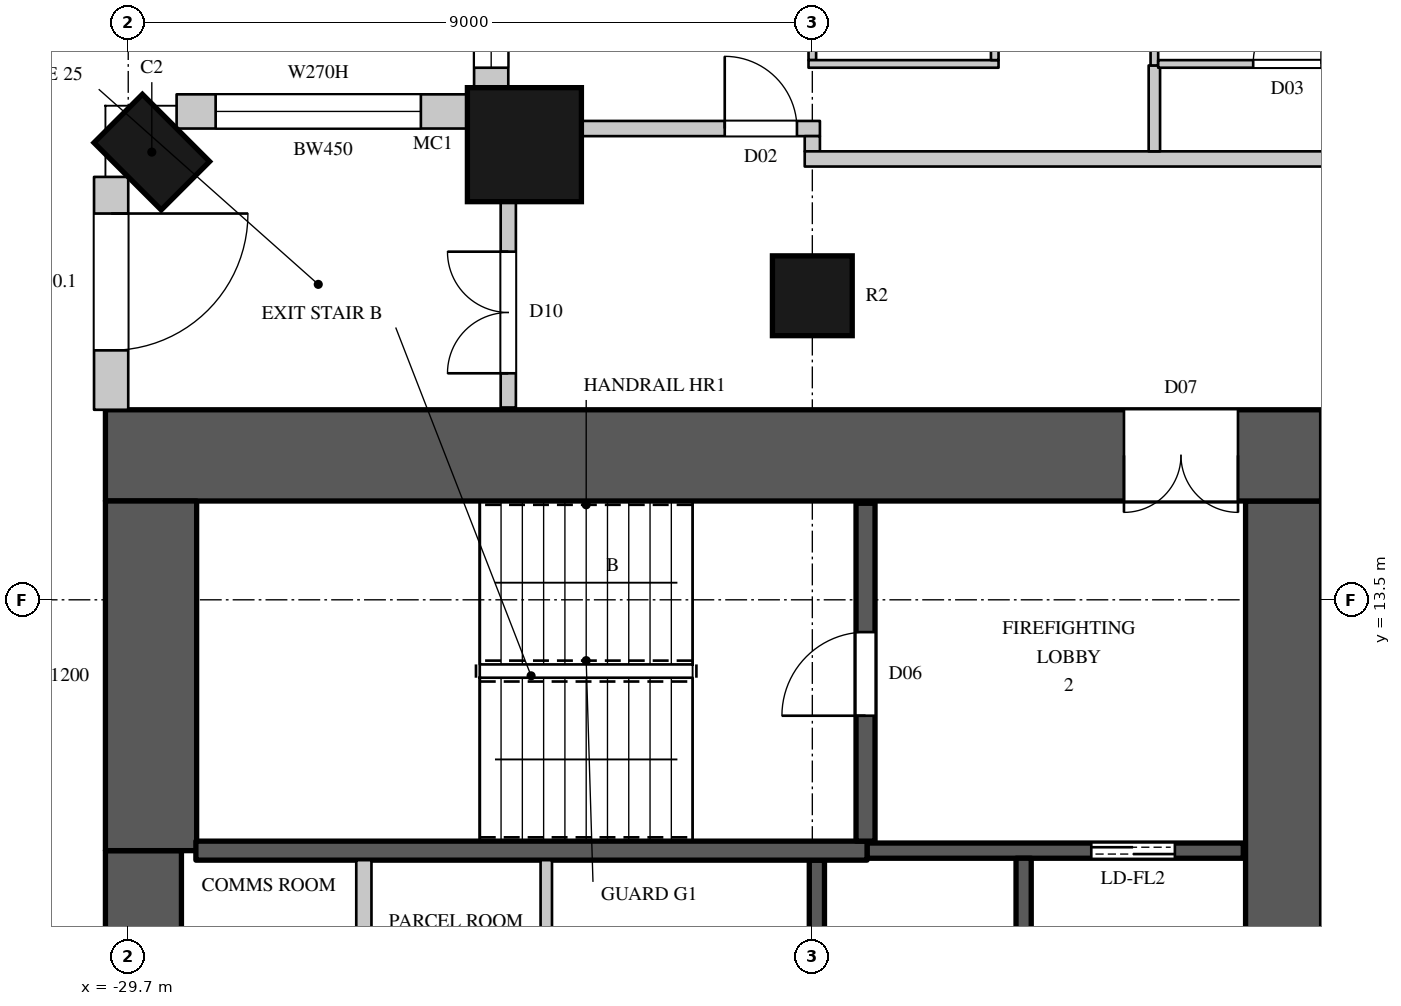
"""IFC4 building model, lengths in metres.
Left out: names, types, materials, properties, quantities, classifications, styles, units other than length and angle.
Written with IfcOpenShell. Run it as: python <this file> out.ifc"""

import sys

from ifc_helpers import new_model, si_unit, direction, frame, frame_2d, origin, origin_2d, place, context, subcontext, project, spatial, rectangle, circle, extrude, element, fill, save


model = new_model("IFC4")
c1 = context("Model", 3, precision=1e-05, world=origin(), true_north=direction((0.0, 1.0)))
c2 = subcontext(c1, "Body", "Model", "MODEL_VIEW")
j1 = project(units=[si_unit("LENGTHUNIT", "METRE"), si_unit("PLANEANGLEUNIT", "RADIAN")], contexts=[c1])
p1 = place(None, origin())
s1 = spatial("IfcSite", under=j1, at=p1, CompositionType="ELEMENT")
p2 = place(p1, origin())
s2 = spatial("IfcBuilding", under=s1, at=p2, CompositionType="ELEMENT")
p3 = place(p2, frame((0.0, 0.0, 120.3)))
s3 = spatial("IfcBuildingStorey", under=s2, at=p3, CompositionType="ELEMENT", Elevation=120.3)
p4 = place(p3, frame((-29.39, 19.39, 0.0), z_axis=(0.0, 0.0, 1.0), x_axis=(-0.707106781187, -0.707106781187, 0.0)))
e1 = element("IfcColumn", 1, at=p4, inside=s3, PredefinedType="COLUMN", context=c2, shape_type="SweptSolid", body=[
    extrude(rectangle(XDim=0.9, YDim=1.25, at=origin_2d()), origin(), (0.0, 0.0, 1.0), 3.6),
])
p5 = place(p3, frame((-24.488, 19.488, 0.0), z_axis=(0.0, 0.0, 1.0), x_axis=(1.0, 0.0, 0.0)))
e2 = element("IfcColumn", 2, at=p5, inside=s3, PredefinedType="COLUMN", context=c2, shape_type="SweptSolid", body=[
    extrude(circle(Radius=0.75, at=origin_2d()), origin(), (0.0, 0.0, 1.0), 3.6),
])
p6 = place(p3, frame((-20.7, 17.5, 0.0), z_axis=(0.0, 0.0, 1.0), x_axis=(1.0, 0.0, 0.0)))
e3 = element("IfcColumn", 3, at=p6, inside=s3, PredefinedType="COLUMN", context=c2, shape_type="SweptSolid", body=[
    extrude(circle(Radius=0.525, at=origin_2d()), origin(), (0.0, 0.0, 1.0), 3.6),
])
p7 = place(p3, frame((-29.925, 19.064, 0.0), z_axis=(0.0, 0.0, 1.0), x_axis=(0.0, -1.0, 0.0)))
e4 = element("IfcWall", 4, at=p7, inside=s3, PredefinedType="SOLIDWALL", context=c2, shape_type="SweptSolid", body=[
    extrude(rectangle(XDim=3.064, YDim=0.45, at=frame_2d((1.532, 0.0))), origin(), (0.0, 0.0, 1.0), 3.3),
])
p8 = place(p7, frame((0.482, 0.0, 0.0)))
e5 = element("IfcOpeningElement", 5, at=p8, cuts=e4, PredefinedType="OPENING", context=c2, shape_type="SweptSolid", body=[
    extrude(rectangle(XDim=1.8, YDim=2.4, at=frame_2d((0.9, 1.2))), frame((0.0, 0.235, 0.0), z_axis=(0.0, -1.0, 0.0), x_axis=(1.0, 0.0, 0.0)), (0.0, 0.0, 1.0), 0.47),
])
p9 = place(p3, frame((-24.925, 22.05, 0.0), z_axis=(0.0, 0.0, 1.0), x_axis=(0.0, -1.0, 0.0)))
e6 = element("IfcWall", 6, at=p9, inside=s3, PredefinedType="SOLIDWALL", context=c2, shape_type="SweptSolid", body=[
    extrude(rectangle(XDim=1.843, YDim=0.45, at=frame_2d((0.921, 0.0))), origin(), (0.0, 0.0, 1.0), 3.3),
])
p10 = place(p9, frame((0.35, 0.0, 1.05)))
e7 = element("IfcOpeningElement", 7, at=p10, cuts=e6, PredefinedType="OPENING", context=c2, shape_type="SweptSolid", body=[
    extrude(rectangle(XDim=1.2, YDim=2.0, at=frame_2d((0.6, 1.0))), frame((0.0, 0.235, 0.0), z_axis=(0.0, -1.0, 0.0), x_axis=(1.0, 0.0, 0.0)), (0.0, 0.0, 1.0), 0.47),
])
p11 = place(p3, frame((-25.207, 19.925, 0.0), z_axis=(0.0, 0.0, 1.0), x_axis=(-1.0, 0.0, 0.0)))
e8 = element("IfcWall", 8, at=p11, inside=s3, PredefinedType="SOLIDWALL", context=c2, shape_type="SweptSolid", body=[
    extrude(rectangle(XDim=3.857, YDim=0.45, at=frame_2d((1.928, 0.0))), origin(), (0.0, 0.0, 1.0), 3.3),
])
p12 = place(p11, frame((0.643, 0.0, 1.05)))
e9 = element("IfcOpeningElement", 9, at=p12, cuts=e8, PredefinedType="OPENING", context=c2, shape_type="SweptSolid", body=[
    extrude(rectangle(XDim=2.7, YDim=2.0, at=frame_2d((1.35, 1.0))), frame((0.0, 0.235, 0.0), z_axis=(0.0, -1.0, 0.0), x_axis=(1.0, 0.0, 0.0)), (0.0, 0.0, 1.0), 0.47),
])
p13 = place(p3, frame((-30.0, 15.4, 0.0), z_axis=(0.0, 0.0, 1.0), x_axis=(1.0, 0.0, 0.0)))
e10 = element("IfcWall", 10, at=p13, inside=s3, PredefinedType="SHEAR", context=c2, shape_type="SweptSolid", body=[
    extrude(rectangle(XDim=16.0, YDim=1.2, at=frame_2d((8.0, 0.0))), origin(), (0.0, 0.0, 1.0), 3.6),
])
p14 = place(p13, frame((13.4, 0.0, 0.0)))
e11 = element("IfcOpeningElement", 11, at=p14, cuts=e10, PredefinedType="OPENING", context=c2, shape_type="SweptSolid", body=[
    extrude(rectangle(XDim=1.5, YDim=2.4, at=frame_2d((0.75, 1.2))), frame((0.0, 0.61, 0.0), z_axis=(0.0, -1.0, 0.0), x_axis=(1.0, 0.0, 0.0)), (0.0, 0.0, 1.0), 1.22),
])
p15 = place(p3, frame((-14.5, -14.8, 0.0), z_axis=(0.0, 0.0, 1.0), x_axis=(0.0, 1.0, 0.0)))
e12 = element("IfcWall", 12, at=p15, inside=s3, PredefinedType="SHEAR", context=c2, shape_type="SweptSolid", body=[
    extrude(rectangle(XDim=29.6, YDim=1.0, at=frame_2d((14.8, 0.0))), origin(), (0.0, 0.0, 1.0), 3.6),
])
p16 = place(p15, frame((8.45, 0.0, 0.0)))
e13 = element("IfcOpeningElement", 13, at=p16, cuts=e12, PredefinedType="OPENING", context=c2, shape_type="SweptSolid", body=[
    extrude(rectangle(XDim=1.5, YDim=2.4, at=frame_2d((0.75, 1.2))), frame((0.0, 0.51, 0.0), z_axis=(0.0, -1.0, 0.0), x_axis=(1.0, 0.0, 0.0)), (0.0, 0.0, 1.0), 1.02),
])
p17 = place(p15, frame((19.65, 0.0, 0.0)))
e14 = element("IfcOpeningElement", 14, at=p17, cuts=e12, PredefinedType="OPENING", context=c2, shape_type="SweptSolid", body=[
    extrude(rectangle(XDim=1.5, YDim=2.4, at=frame_2d((0.75, 1.2))), frame((0.0, 0.51, 0.0), z_axis=(0.0, -1.0, 0.0), x_axis=(1.0, 0.0, 0.0)), (0.0, 0.0, 1.0), 1.02),
])
p18 = place(p15, frame((14.5, 0.0, 0.0)))
e15 = element("IfcOpeningElement", 15, at=p18, cuts=e12, PredefinedType="OPENING", context=c2, shape_type="SweptSolid", body=[
    extrude(rectangle(XDim=0.6, YDim=2.0, at=frame_2d((0.3, 1.0))), frame((0.0, 0.51, 0.0), z_axis=(0.0, -1.0, 0.0), x_axis=(1.0, 0.0, 0.0)), (0.0, 0.0, 1.0), 1.02),
])
p19 = place(p3, frame((-29.5, -10.2, 0.0), z_axis=(0.0, 0.0, 1.0), x_axis=(0.0, 1.0, 0.0)))
e16 = element("IfcWall", 16, at=p19, inside=s3, PredefinedType="SHEAR", context=c2, shape_type="SweptSolid", body=[
    extrude(rectangle(XDim=20.4, YDim=1.0, at=frame_2d((10.2, 0.0))), origin(), (0.0, 0.0, 1.0), 3.6),
])
p20 = place(p3, frame((-29.4, 10.2, 0.0), z_axis=(0.0, 0.0, 1.0), x_axis=(0.0, 1.0, 0.0)))
e17 = element("IfcWall", 17, at=p20, inside=s3, PredefinedType="SHEAR", context=c2, shape_type="SweptSolid", body=[
    extrude(rectangle(XDim=4.6, YDim=1.2, at=frame_2d((2.3, 0.0))), origin(), (0.0, 0.0, 1.0), 3.6),
])
p21 = place(p3, frame((-24.7, 16.03, 0.0), z_axis=(0.0, 0.0, 1.0), x_axis=(0.0, 1.0, 0.0)))
e18 = element("IfcWall", 18, at=p21, inside=s3, PredefinedType="PARTITIONING", context=c2, shape_type="SweptSolid", body=[
    extrude(rectangle(XDim=2.722, YDim=0.2, at=frame_2d((1.361, 0.0))), origin(), (0.0, 0.0, 1.0), 3.3),
])
p22 = place(p21, frame((0.45, 0.0, 0.0)))
e19 = element("IfcOpeningElement", 19, at=p22, cuts=e18, PredefinedType="OPENING", context=c2, shape_type="SweptSolid", body=[
    extrude(rectangle(XDim=1.6, YDim=2.4, at=frame_2d((0.8, 1.2))), frame((0.0, 0.11, 0.0), z_axis=(0.0, -1.0, 0.0), x_axis=(1.0, 0.0, 0.0)), (0.0, 0.0, 1.0), 0.22),
])
p23 = place(p3, frame((-23.752, 19.7, 0.0), z_axis=(0.0, 0.0, 1.0), x_axis=(1.0, 0.0, 0.0)))
e20 = element("IfcWall", 20, at=p23, inside=s3, PredefinedType="PARTITIONING", context=c2, shape_type="SweptSolid", body=[
    extrude(rectangle(XDim=3.152, YDim=0.2, at=frame_2d((1.576, 0.0))), origin(), (0.0, 0.0, 1.0), 3.3),
])
p24 = place(p23, frame((1.9, 0.0, 0.0)))
e21 = element("IfcOpeningElement", 21, at=p24, cuts=e20, PredefinedType="OPENING", context=c2, shape_type="SweptSolid", body=[
    extrude(rectangle(XDim=0.95, YDim=2.2, at=frame_2d((0.475, 1.1))), frame((0.0, 0.11, 0.0), z_axis=(0.0, -1.0, 0.0), x_axis=(1.0, 0.0, 0.0)), (0.0, 0.0, 1.0), 0.22),
])
p25 = place(p3, frame((-20.7, 19.4, 0.0), z_axis=(0.0, 0.0, 1.0), x_axis=(0.0, 1.0, 0.0)))
e22 = element("IfcWall", 22, at=p25, inside=s3, PredefinedType="PARTITIONING", context=c2, shape_type="SweptSolid", body=[
    extrude(rectangle(XDim=0.2, YDim=0.2, at=frame_2d((0.1, 0.0))), origin(), (0.0, 0.0, 1.0), 3.3),
])
p26 = place(p3, frame((-20.8, 19.3, 0.0), z_axis=(0.0, 0.0, 1.0), x_axis=(1.0, 0.0, 0.0)))
e23 = element("IfcWall", 23, at=p26, inside=s3, PredefinedType="PARTITIONING", context=c2, shape_type="SweptSolid", body=[
    extrude(rectangle(XDim=38.464, YDim=0.2, at=frame_2d((19.232, 0.0))), origin(), (0.0, 0.0, 1.0), 3.3),
])
p27 = place(p26, frame((24.05, 0.0, 0.0)))
e24 = element("IfcOpeningElement", 24, at=p27, cuts=e23, PredefinedType="OPENING", context=c2, shape_type="SweptSolid", body=[
    extrude(rectangle(XDim=0.9, YDim=2.2, at=frame_2d((0.45, 1.1))), frame((0.0, 0.11, 0.0), z_axis=(0.0, -1.0, 0.0), x_axis=(1.0, 0.0, 0.0)), (0.0, 0.0, 1.0), 0.22),
])
p28 = place(p26, frame((11.2, 0.0, 0.0)))
e25 = element("IfcOpeningElement", 25, at=p28, cuts=e23, PredefinedType="OPENING", context=c2, shape_type="SweptSolid", body=[
    extrude(rectangle(XDim=0.95, YDim=2.2, at=frame_2d((0.475, 1.1))), frame((0.0, 0.11, 0.0), z_axis=(0.0, -1.0, 0.0), x_axis=(1.0, 0.0, 0.0)), (0.0, 0.0, 1.0), 0.22),
])
p29 = place(p26, frame((15.05, 0.0, 0.0)))
e26 = element("IfcOpeningElement", 26, at=p29, cuts=e23, PredefinedType="OPENING", context=c2, shape_type="SweptSolid", body=[
    extrude(rectangle(XDim=0.95, YDim=2.2, at=frame_2d((0.475, 1.1))), frame((0.0, 0.11, 0.0), z_axis=(0.0, -1.0, 0.0), x_axis=(1.0, 0.0, 0.0)), (0.0, 0.0, 1.0), 0.22),
])
p30 = place(p26, frame((32.0, 0.0, 0.0)))
e27 = element("IfcOpeningElement", 27, at=p30, cuts=e23, PredefinedType="OPENING", context=c2, shape_type="SweptSolid", body=[
    extrude(rectangle(XDim=0.95, YDim=2.2, at=frame_2d((0.475, 1.1))), frame((0.0, 0.11, 0.0), z_axis=(0.0, -1.0, 0.0), x_axis=(1.0, 0.0, 0.0)), (0.0, 0.0, 1.0), 0.22),
])
p31 = place(p3, frame((-24.2, 7.5, 0.0), z_axis=(0.0, 0.0, 1.0), x_axis=(0.0, 1.0, 0.0)))
e28 = element("IfcWall", 28, at=p31, inside=s3, PredefinedType="PARTITIONING", context=c2, shape_type="SweptSolid", body=[
    extrude(rectangle(XDim=2.575, YDim=0.15, at=frame_2d((1.288, 0.0))), origin(), (0.0, 0.0, 1.0), 3.3),
])
p32 = place(p3, frame((-16.2, 19.4, 0.0), z_axis=(0.0, 0.0, 1.0), x_axis=(0.0, 1.0, 0.0)))
e29 = element("IfcWall", 29, at=p32, inside=s3, PredefinedType="PARTITIONING", context=c2, shape_type="SweptSolid", body=[
    extrude(rectangle(XDim=1.13, YDim=0.15, at=frame_2d((0.565, 0.0))), origin(), (0.0, 0.0, 1.0), 2.65),
])
p33 = place(p3, frame((-26.6, 7.5, 0.0), z_axis=(0.0, 0.0, 1.0), x_axis=(0.0, 1.0, 0.0)))
e30 = element("IfcWall", 30, at=p33, inside=s3, PredefinedType="PARTITIONING", context=c2, shape_type="SweptSolid", body=[
    extrude(rectangle(XDim=2.575, YDim=0.2, at=frame_2d((1.288, 0.0))), origin(), (0.0, 0.0, 1.0), 3.3),
])
p34 = place(p3, frame((-20.64, 7.5, 0.0), z_axis=(0.0, 0.0, 1.0), x_axis=(0.0, 1.0, 0.0)))
e31 = element("IfcWall", 31, at=p34, inside=s3, PredefinedType="SHEAR", context=c2, shape_type="SweptSolid", body=[
    extrude(rectangle(XDim=2.575, YDim=0.2, at=frame_2d((1.288, 0.0))), origin(), (0.0, 0.0, 1.0), 3.3),
])
p35 = place(p3, frame((-19.98, 10.2, 0.0), z_axis=(0.0, 0.0, 1.0), x_axis=(1.0, 0.0, 0.0)))
e32 = element("IfcWall", 32, at=p35, inside=s3, PredefinedType="SHEAR", context=c2, shape_type="SweptSolid", body=[
    extrude(rectangle(XDim=4.95, YDim=0.2, at=frame_2d((2.475, 0.0))), origin(), (0.0, 0.0, 1.0), 3.3),
])
p36 = place(p35, frame((2.95, 0.0, 0.0)))
e33 = element("IfcOpeningElement", 33, at=p36, cuts=e32, PredefinedType="OPENING", context=c2, shape_type="SweptSolid", body=[
    extrude(rectangle(XDim=1.1, YDim=2.2, at=frame_2d((0.55, 1.1))), frame((0.0, 0.11, 0.0), z_axis=(0.0, -1.0, 0.0), x_axis=(1.0, 0.0, 0.0)), (0.0, 0.0, 1.0), 0.22),
])
p37 = place(p3, frame((-17.92, 7.5, 0.0), z_axis=(0.0, 0.0, 1.0), x_axis=(0.0, 1.0, 0.0)))
e34 = element("IfcWall", 34, at=p37, inside=s3, PredefinedType="SHEAR", context=c2, shape_type="SweptSolid", body=[
    extrude(rectangle(XDim=2.6, YDim=0.2, at=frame_2d((1.3, 0.0))), origin(), (0.0, 0.0, 1.0), 3.6),
])
p38 = place(p3, frame((-28.81, 10.2, 0.0), z_axis=(0.0, 0.0, 1.0), x_axis=(1.0, 0.0, 0.0)))
e35 = element("IfcWall", 35, at=p38, inside=s3, PredefinedType="SHEAR", context=c2, shape_type="SweptSolid", body=[
    extrude(rectangle(XDim=8.83, YDim=0.25, at=frame_2d((4.415, 0.0))), origin(), (0.0, 0.0, 1.0), 3.3),
])
p39 = place(p3, frame((-20.0, 10.325, 0.0), z_axis=(0.0, 0.0, 1.0), x_axis=(0.0, 1.0, 0.0)))
e36 = element("IfcWall", 36, at=p39, inside=s3, PredefinedType="SHEAR", context=c2, shape_type="SweptSolid", body=[
    extrude(rectangle(XDim=4.445, YDim=0.25, at=frame_2d((2.223, 0.0))), origin(), (0.0, 0.0, 1.0), 3.3),
])
p40 = place(p39, frame((1.65, 0.0, 0.0)))
e37 = element("IfcOpeningElement", 37, at=p40, cuts=e36, PredefinedType="OPENING", context=c2, shape_type="SweptSolid", body=[
    extrude(rectangle(XDim=1.1, YDim=2.2, at=frame_2d((0.55, 1.1))), frame((0.0, 0.135, 0.0), z_axis=(0.0, -1.0, 0.0), x_axis=(1.0, 0.0, 0.0)), (0.0, 0.0, 1.0), 0.27),
])
p41 = place(p3, frame((-20.7, 20.6, 0.0), z_axis=(0.0, 0.0, 1.0), x_axis=(0.0, 1.0, 0.0)))
e38 = element("IfcWall", 38, at=p41, inside=s3, PredefinedType="PARTITIONING", context=c2, shape_type="SweptSolid", body=[
    extrude(rectangle(XDim=2.6, YDim=0.1, at=frame_2d((1.3, 0.0))), origin(), (0.0, 0.0, 1.0), 2.75),
])
p42 = place(p41, frame((0.85, 0.0, 0.0)))
e39 = element("IfcOpeningElement", 39, at=p42, cuts=e38, PredefinedType="OPENING", context=c2, shape_type="SweptSolid", body=[
    extrude(rectangle(XDim=0.9, YDim=2.2, at=frame_2d((0.45, 1.1))), frame((0.0, 0.06, 0.0), z_axis=(0.0, -1.0, 0.0), x_axis=(1.0, 0.0, 0.0)), (0.0, 0.0, 1.0), 0.12),
])
p43 = place(p3, frame((-20.75, 20.55, 0.0), z_axis=(0.0, 0.0, 1.0), x_axis=(1.0, 0.0, 0.0)))
e40 = element("IfcWall", 40, at=p43, inside=s3, PredefinedType="PARTITIONING", context=c2, shape_type="SweptSolid", body=[
    extrude(rectangle(XDim=2.5, YDim=0.1, at=frame_2d((1.25, 0.0))), origin(), (0.0, 0.0, 1.0), 3.3),
])
p44 = place(p3, frame((-18.3, 20.6, 0.0), z_axis=(0.0, 0.0, 1.0), x_axis=(0.0, 1.0, 0.0)))
e41 = element("IfcWall", 41, at=p44, inside=s3, PredefinedType="PARTITIONING", context=c2, shape_type="SweptSolid", body=[
    extrude(rectangle(XDim=2.6, YDim=0.1, at=frame_2d((1.3, 0.0))), origin(), (0.0, 0.0, 1.0), 3.3),
])
p45 = place(p3, frame((-16.2, 20.53, 0.0), z_axis=(0.0, 0.0, 1.0), x_axis=(0.0, 1.0, 0.0)))
e42 = element("IfcWall", 42, at=p45, inside=s3, PredefinedType="PARTITIONING", context=c2, shape_type="SweptSolid", body=[
    extrude(rectangle(XDim=2.74, YDim=0.1, at=frame_2d((1.37, 0.0))), origin(), (0.0, 0.0, 1.0), 2.65),
])
p46 = place(p3, frame((-16.15, 20.55, 0.0), z_axis=(0.0, 0.0, 1.0), x_axis=(1.0, 0.0, 0.0)))
e43 = element("IfcWall", 43, at=p46, inside=s3, PredefinedType="PARTITIONING", context=c2, shape_type="SweptSolid", body=[
    extrude(rectangle(XDim=2.396, YDim=0.1, at=frame_2d((1.198, 0.0))), origin(), (0.0, 0.0, 1.0), 3.3),
])
p47 = place(p46, frame((1.25, 0.0, 0.0)))
e44 = element("IfcOpeningElement", 44, at=p47, cuts=e43, PredefinedType="OPENING", context=c2, shape_type="SweptSolid", body=[
    extrude(rectangle(XDim=0.9, YDim=2.2, at=frame_2d((0.45, 1.1))), frame((0.0, 0.06, 0.0), z_axis=(0.0, -1.0, 0.0), x_axis=(1.0, 0.0, 0.0)), (0.0, 0.0, 1.0), 0.12),
])
p48 = place(p8, origin())
e45 = element("IfcDoor", 45, at=p48, inside=s3, OperationType="SLIDING_TO_LEFT", PredefinedType="DOOR", context=c2, shape_type="SweptSolid", body=[
    extrude(rectangle(XDim=1.8, YDim=2.4, at=frame_2d((0.9, 1.2))), frame((0.0, 0.13, 0.0), z_axis=(0.0, -1.0, 0.0), x_axis=(1.0, 0.0, 0.0)), (0.0, 0.0, 1.0), 0.05),
])
fill(e5, e45)
p49 = place(p10, origin())
e46 = element("IfcWindow", 46, at=p49, inside=s3, PartitioningType="SINGLE_PANEL", PredefinedType="WINDOW", context=c2, shape_type="SweptSolid", body=[
    extrude(rectangle(XDim=1.2, YDim=2.0, at=frame_2d((0.6, 1.0))), frame((0.0, 0.135, 0.0), z_axis=(0.0, -1.0, 0.0), x_axis=(1.0, 0.0, 0.0)), (0.0, 0.0, 1.0), 0.06),
])
fill(e7, e46)
p50 = place(p12, origin())
e47 = element("IfcWindow", 47, at=p50, inside=s3, PartitioningType="SINGLE_PANEL", PredefinedType="WINDOW", context=c2, shape_type="SweptSolid", body=[
    extrude(rectangle(XDim=2.7, YDim=2.0, at=frame_2d((1.35, 1.0))), frame((0.0, 0.135, 0.0), z_axis=(0.0, -1.0, 0.0), x_axis=(1.0, 0.0, 0.0)), (0.0, 0.0, 1.0), 0.06),
])
fill(e9, e47)
p51 = place(p40, origin())
e48 = element("IfcDoor", 48, at=p51, inside=s3, OperationType="SINGLE_SWING_LEFT", PredefinedType="DOOR", context=c2, shape_type="SweptSolid", body=[
    extrude(rectangle(XDim=1.1, YDim=2.2, at=frame_2d((0.55, 1.1))), frame((0.0, 0.025, 0.0), z_axis=(0.0, -1.0, 0.0), x_axis=(1.0, 0.0, 0.0)), (0.0, 0.0, 1.0), 0.05),
])
fill(e37, e48)
p52 = place(p36, origin())
e49 = element("IfcDoor", 49, at=p52, inside=s3, OperationType="DOUBLE_DOOR_SLIDING", PredefinedType="DOOR", context=c2, shape_type="SweptSolid", body=[
    extrude(rectangle(XDim=1.1, YDim=2.2, at=frame_2d((0.55, 1.1))), frame((0.0, 0.025, 0.0), z_axis=(0.0, -1.0, 0.0), x_axis=(1.0, 0.0, 0.0)), (0.0, 0.0, 1.0), 0.05),
])
fill(e33, e49)
p53 = place(p22, origin())
e50 = element("IfcDoor", 50, at=p53, inside=s3, OperationType="DOUBLE_DOOR_SINGLE_SWING", PredefinedType="DOOR", context=c2, shape_type="SweptSolid", body=[
    extrude(rectangle(XDim=1.6, YDim=2.4, at=frame_2d((0.8, 1.2))), frame((0.0, 0.025, 0.0), z_axis=(0.0, -1.0, 0.0), x_axis=(1.0, 0.0, 0.0)), (0.0, 0.0, 1.0), 0.05),
])
fill(e19, e50)
p54 = place(p24, origin())
e51 = element("IfcDoor", 51, at=p54, inside=s3, OperationType="SINGLE_SWING_LEFT", PredefinedType="DOOR", context=c2, shape_type="SweptSolid", body=[
    extrude(rectangle(XDim=0.95, YDim=2.2, at=frame_2d((0.475, 1.1))), frame((0.0, 0.025, 0.0), z_axis=(0.0, -1.0, 0.0), x_axis=(1.0, 0.0, 0.0)), (0.0, 0.0, 1.0), 0.05),
])
fill(e21, e51)
p55 = place(p47, origin())
e52 = element("IfcDoor", 52, at=p55, inside=s3, OperationType="SINGLE_SWING_RIGHT", PredefinedType="DOOR", context=c2, shape_type="SweptSolid", body=[
    extrude(rectangle(XDim=0.9, YDim=2.2, at=frame_2d((0.45, 1.1))), frame((0.0, 0.025, 0.0), z_axis=(0.0, -1.0, 0.0), x_axis=(1.0, 0.0, 0.0)), (0.0, 0.0, 1.0), 0.05),
])
fill(e44, e52)
p56 = place(p14, origin())
e53 = element("IfcDoor", 53, at=p56, inside=s3, OperationType="DOUBLE_DOOR_SINGLE_SWING", PredefinedType="DOOR", context=c2, shape_type="SweptSolid", body=[
    extrude(rectangle(XDim=1.5, YDim=2.4, at=frame_2d((0.75, 1.2))), frame((0.0, 0.025, 0.0), z_axis=(0.0, -1.0, 0.0), x_axis=(1.0, 0.0, 0.0)), (0.0, 0.0, 1.0), 0.05),
])
fill(e11, e53)
save(model, sys.argv[1])
